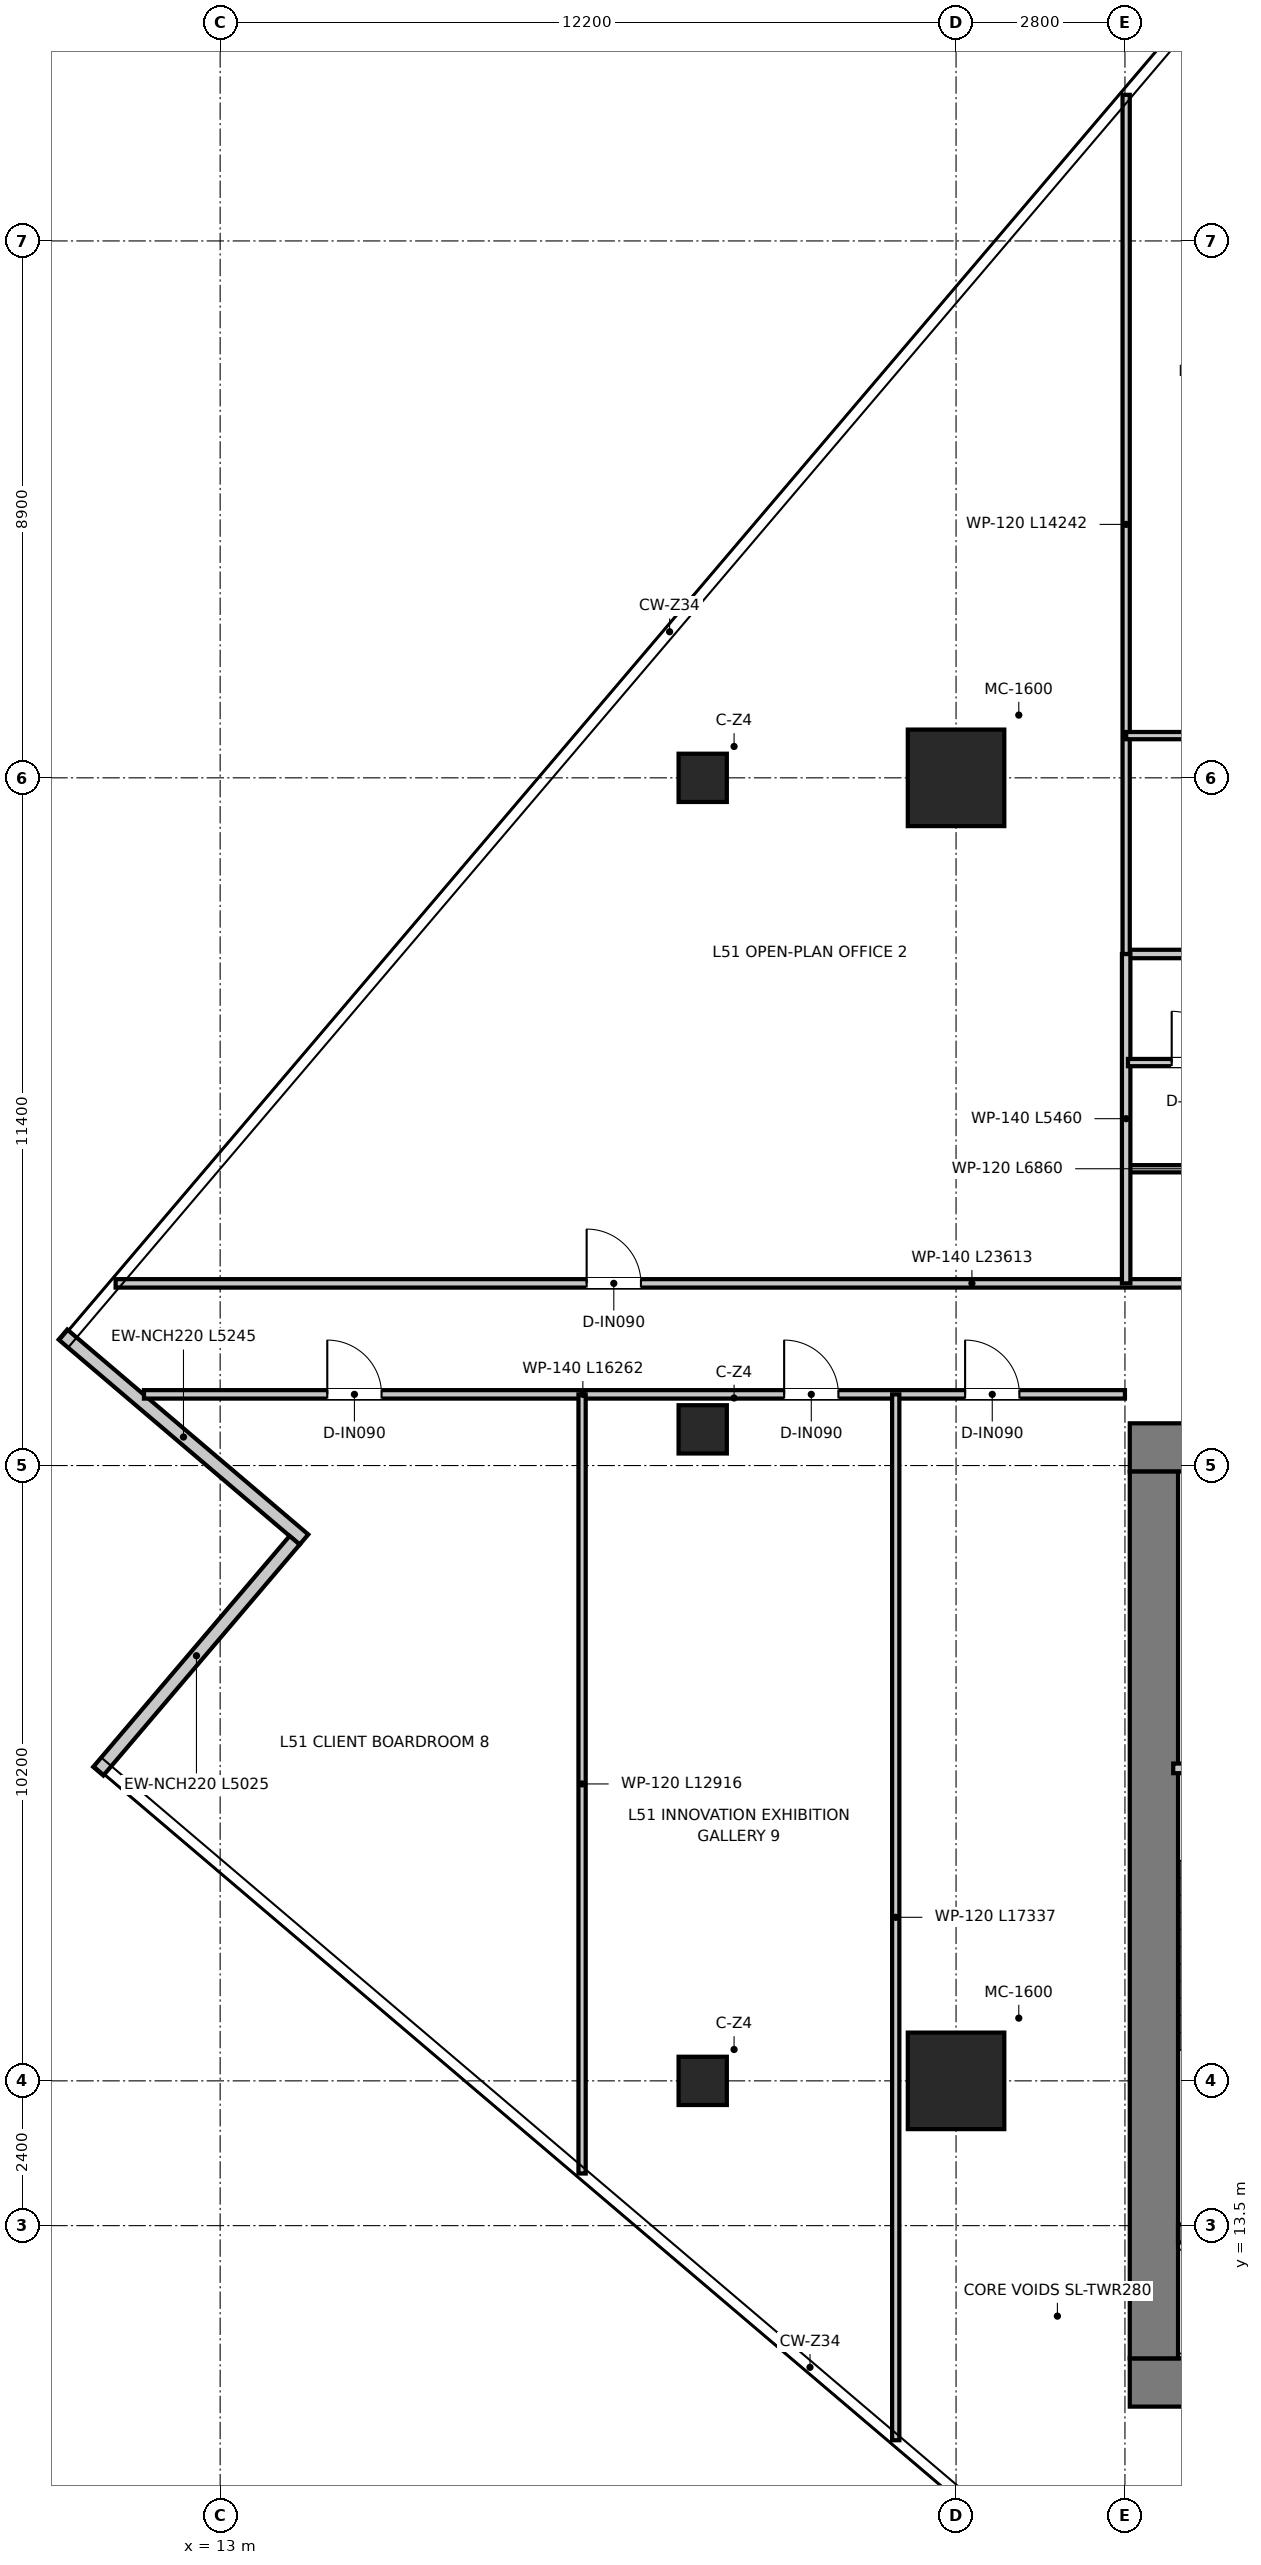
"""IFC4 building model, lengths in metres.
Left out: names, types, materials, properties, quantities, classifications, styles, units other than length and angle.
Written with IfcOpenShell. Run it as: python <this file> out.ifc"""

import sys

from ifc_helpers import new_model, si_unit, direction, frame, frame_2d, origin, origin_2d, place, context, subcontext, project, spatial, rectangle, extrude, source, transform, mapped, element, fill, save


model = new_model("IFC4")
c1 = context("Model", 3, precision=1e-05, world=origin(), true_north=direction((0.0, 1.0)))
c2 = subcontext(c1, "Body", "Model", "MODEL_VIEW")
j1 = project(units=[si_unit("LENGTHUNIT", "METRE"), si_unit("PLANEANGLEUNIT", "RADIAN")], contexts=[c1])
p1 = place(None, origin())
s1 = spatial("IfcSite", under=j1, at=p1, CompositionType="ELEMENT")
p2 = place(p1, origin())
s2 = spatial("IfcBuilding", under=s1, at=p2, CompositionType="ELEMENT")
p3 = place(p2, frame((0.0, 0.0, 211.25)))
s3 = spatial("IfcBuildingStorey", under=s2, at=p3, CompositionType="ELEMENT", Elevation=211.25)
p4 = place(p3, frame((28.08, 10.9, 0.0), z_axis=(0.0, 0.0, 1.0), x_axis=(1.0, 0.0, 0.0)))
e1 = element("IfcWall", 1, at=p4, inside=s3, PredefinedType="SHEAR", context=c2, shape_type="SweptSolid", body=[
    extrude(rectangle(XDim=15.84, YDim=0.8, at=frame_2d((7.92, 0.0))), origin(), (0.0, 0.0, 1.0), 3.95),
])
p5 = place(p3, frame((28.08, 26.4, 0.0), z_axis=(0.0, 0.0, 1.0), x_axis=(1.0, 0.0, 0.0)))
e2 = element("IfcWall", 2, at=p5, inside=s3, PredefinedType="SHEAR", context=c2, shape_type="SweptSolid", body=[
    extrude(rectangle(XDim=15.84, YDim=0.8, at=frame_2d((7.92, 0.0))), origin(), (0.0, 0.0, 1.0), 3.95),
])
p6 = place(p5, frame((7.22, 0.0, 0.0)))
e3 = element("IfcOpeningElement", 3, at=p6, cuts=e2, PredefinedType="OPENING", context=c2, shape_type="SweptSolid", body=[
    extrude(rectangle(XDim=1.4, YDim=2.2, at=frame_2d((0.7, 1.1))), frame((0.0, 0.41, 0.0), z_axis=(0.0, -1.0, 0.0), x_axis=(1.0, 0.0, 0.0)), (0.0, 0.0, 1.0), 0.82),
])
p7 = place(p5, frame((1.775, 0.0, 0.0)))
e4 = element("IfcOpeningElement", 4, at=p7, cuts=e2, PredefinedType="OPENING", context=c2, shape_type="SweptSolid", body=[
    extrude(rectangle(XDim=1.05, YDim=2.1, at=frame_2d((0.525, 1.05))), frame((0.0, 0.41, 0.0), z_axis=(0.0, -1.0, 0.0), x_axis=(1.0, 0.0, 0.0)), (0.0, 0.0, 1.0), 0.82),
])
p8 = place(p5, frame((13.015, 0.0, 0.0)))
e5 = element("IfcOpeningElement", 5, at=p8, cuts=e2, PredefinedType="OPENING", context=c2, shape_type="SweptSolid", body=[
    extrude(rectangle(XDim=1.05, YDim=2.1, at=frame_2d((0.525, 1.05))), frame((0.0, 0.41, 0.0), z_axis=(0.0, -1.0, 0.0), x_axis=(1.0, 0.0, 0.0)), (0.0, 0.0, 1.0), 0.82),
])
p9 = place(p3, frame((28.48, 11.3, 0.0), z_axis=(0.0, 0.0, 1.0), x_axis=(0.0, 1.0, 0.0)))
e6 = element("IfcWall", 6, at=p9, inside=s3, PredefinedType="SHEAR", context=c2, shape_type="SweptSolid", body=[
    extrude(rectangle(XDim=14.7, YDim=0.8, at=frame_2d((7.35, 0.0))), origin(), (0.0, 0.0, 1.0), 3.95),
])
p10 = place(p3, frame((28.88, 13.37, 0.0), z_axis=(0.0, 0.0, 1.0), x_axis=(1.0, 0.0, 0.0)))
e7 = element("IfcWall", 7, at=p10, inside=s3, PredefinedType="SHEAR", context=c2, shape_type="SweptSolid", body=[
    extrude(rectangle(XDim=3.1, YDim=0.3, at=frame_2d((1.55, 0.0))), origin(), (0.0, 0.0, 1.0), 3.95),
])
m1 = source(origin(), c2, "Body", "SweptSolid", [
    extrude(rectangle(XDim=1.6, YDim=1.6, at=origin_2d()), origin(), (0.0, 0.0, 1.0), 3.95),
])
for number, where, z_axis, x_axis in (
    (8, (25.2, 15.9, 0.0), (0.0, 0.0, 1.0), (1.0, 0.0, 0.0)),
    (9, (25.2, 37.5, 0.0), (0.0, 0.0, 1.0), (1.0, 0.0, 0.0)),
):
    element("IfcColumn", number, at=place(p3, frame(where, z_axis=z_axis, x_axis=x_axis)), inside=s3, PredefinedType="USERDEFINED", context=c2, shape_type="MappedRepresentation", body=[
        mapped(m1, transform((0.0, 0.0, 0.0), x_axis=(1.0, 0.0, 0.0), y_axis=(0.0, 1.0, 0.0), z_axis=(0.0, 0.0, 1.0), scale=1.0)),
    ])
m2 = source(origin(), c2, "Body", "SweptSolid", [
    extrude(rectangle(XDim=0.8, YDim=0.8, at=origin_2d()), origin(), (0.0, 0.0, 1.0), 3.95),
])
for number, where, z_axis, x_axis in (
    (10, (21.0, 15.9, 0.0), (0.0, 0.0, 1.0), (1.0, 0.0, 0.0)),
    (11, (21.0, 26.7, 0.0), (0.0, 0.0, 1.0), (1.0, 0.0, 0.0)),
    (12, (21.0, 37.5, 0.0), (0.0, 0.0, 1.0), (1.0, 0.0, 0.0)),
):
    element("IfcColumn", number, at=place(p3, frame(where, z_axis=z_axis, x_axis=x_axis)), inside=s3, PredefinedType="COLUMN", context=c2, shape_type="MappedRepresentation", body=[
        mapped(m2, transform((0.0, 0.0, 0.0), x_axis=(1.0, 0.0, 0.0), y_axis=(0.0, 1.0, 0.0), z_axis=(0.0, 0.0, 1.0), scale=1.0)),
    ])
p11 = place(p3, frame((10.394, 28.271, 0.0), z_axis=(0.0, 0.0, 1.0), x_axis=(0.761803778304, -0.647807844474, 0.0)))
e13 = element("IfcWall", 13, at=p11, inside=s3, PredefinedType="ELEMENTEDWALL", context=c2, shape_type="SweptSolid", body=[
    extrude(rectangle(XDim=5.245, YDim=0.22, at=frame_2d((2.623, 0.0))), origin(), (0.0, 0.0, 1.0), 3.67),
])
p12 = place(p3, frame((14.235, 24.861, 0.0), z_axis=(0.0, 0.0, 1.0), x_axis=(-0.647765464437, -0.761839814583, 0.0)))
e14 = element("IfcWall", 14, at=p12, inside=s3, PredefinedType="ELEMENTEDWALL", context=c2, shape_type="SweptSolid", body=[
    extrude(rectangle(XDim=5.025, YDim=0.22, at=frame_2d((2.513, 0.0))), origin(), (0.0, 0.0, 1.0), 3.67),
])
p13 = place(p3, frame((28.8, 21.08, 0.0), z_axis=(0.0, 0.0, 1.0), x_axis=(1.0, 0.0, 0.0)))
e15 = element("IfcWall", 15, at=p13, inside=s3, PredefinedType="PARTITIONING", context=c2, shape_type="SweptSolid", body=[
    extrude(rectangle(XDim=3.16, YDim=0.16, at=frame_2d((1.58, 0.0))), origin(), (0.0, 0.0, 1.0), 3.67),
])
p14 = place(p13, frame((1.055, 0.0, 0.0)))
e16 = element("IfcOpeningElement", 16, at=p14, cuts=e15, PredefinedType="OPENING", context=c2, shape_type="SweptSolid", body=[
    extrude(rectangle(XDim=1.05, YDim=2.1, at=frame_2d((0.525, 1.05))), frame((0.0, 0.09, 0.0), z_axis=(0.0, -1.0, 0.0), x_axis=(1.0, 0.0, 0.0)), (0.0, 0.0, 1.0), 0.18),
])
p15 = place(p3, frame((11.267, 29.12, 0.0), z_axis=(0.0, 0.0, 1.0), x_axis=(1.0, 0.0, 0.0)))
e17 = element("IfcWall", 17, at=p15, inside=s3, PredefinedType="PARTITIONING", context=c2, shape_type="SweptSolid", body=[
    extrude(rectangle(XDim=23.613, YDim=0.14, at=frame_2d((11.807, 0.0))), origin(), (0.0, 0.0, 1.0), 3.03),
])
p16 = place(p15, frame((19.683, 0.0, 0.0)))
e18 = element("IfcOpeningElement", 18, at=p16, cuts=e17, PredefinedType="OPENING", context=c2, shape_type="SweptSolid", body=[
    extrude(rectangle(XDim=0.9, YDim=2.1, at=frame_2d((0.45, 1.05))), frame((0.0, 0.08, 0.0), z_axis=(0.0, -1.0, 0.0), x_axis=(1.0, 0.0, 0.0)), (0.0, 0.0, 1.0), 0.16),
])
p17 = place(p15, frame((7.809, 0.0, 0.0)))
e19 = element("IfcOpeningElement", 19, at=p17, cuts=e17, PredefinedType="OPENING", context=c2, shape_type="SweptSolid", body=[
    extrude(rectangle(XDim=0.9, YDim=2.1, at=frame_2d((0.45, 1.05))), frame((0.0, 0.08, 0.0), z_axis=(0.0, -1.0, 0.0), x_axis=(1.0, 0.0, 0.0)), (0.0, 0.0, 1.0), 0.16),
])
p18 = place(p3, frame((11.738, 27.28, 0.0), z_axis=(0.0, 0.0, 1.0), x_axis=(1.0, 0.0, 0.0)))
e20 = element("IfcWall", 20, at=p18, inside=s3, PredefinedType="PARTITIONING", context=c2, shape_type="SweptSolid", body=[
    extrude(rectangle(XDim=16.262, YDim=0.14, at=frame_2d((8.131, 0.0))), origin(), (0.0, 0.0, 1.0), 3.03),
])
p19 = place(p18, frame((3.038, 0.0, 0.0)))
e21 = element("IfcOpeningElement", 21, at=p19, cuts=e20, PredefinedType="OPENING", context=c2, shape_type="SweptSolid", body=[
    extrude(rectangle(XDim=0.9, YDim=2.1, at=frame_2d((0.45, 1.05))), frame((0.0, 0.08, 0.0), z_axis=(0.0, -1.0, 0.0), x_axis=(1.0, 0.0, 0.0)), (0.0, 0.0, 1.0), 0.16),
])
p20 = place(p18, frame((10.612, 0.0, 0.0)))
e22 = element("IfcOpeningElement", 22, at=p20, cuts=e20, PredefinedType="OPENING", context=c2, shape_type="SweptSolid", body=[
    extrude(rectangle(XDim=0.9, YDim=2.1, at=frame_2d((0.45, 1.05))), frame((0.0, 0.08, 0.0), z_axis=(0.0, -1.0, 0.0), x_axis=(1.0, 0.0, 0.0)), (0.0, 0.0, 1.0), 0.16),
])
p21 = place(p18, frame((13.612, 0.0, 0.0)))
e23 = element("IfcOpeningElement", 23, at=p21, cuts=e20, PredefinedType="OPENING", context=c2, shape_type="SweptSolid", body=[
    extrude(rectangle(XDim=0.9, YDim=2.1, at=frame_2d((0.45, 1.05))), frame((0.0, 0.08, 0.0), z_axis=(0.0, -1.0, 0.0), x_axis=(1.0, 0.0, 0.0)), (0.0, 0.0, 1.0), 0.16),
])
p22 = place(p3, frame((28.02, 31.02, 0.0), z_axis=(0.0, 0.0, 1.0), x_axis=(1.0, 0.0, 0.0)))
e24 = element("IfcWall", 24, at=p22, inside=s3, PredefinedType="PARTITIONING", context=c2, shape_type="SweptSolid", body=[
    extrude(rectangle(XDim=6.86, YDim=0.12, at=frame_2d((3.43, 0.0))), origin(), (0.0, 0.0, 1.0), 3.18),
])
p23 = place(p3, frame((28.02, 34.58, 0.0), z_axis=(0.0, 0.0, 1.0), x_axis=(1.0, 0.0, 0.0)))
e25 = element("IfcWall", 25, at=p23, inside=s3, PredefinedType="PARTITIONING", context=c2, shape_type="SweptSolid", body=[
    extrude(rectangle(XDim=6.86, YDim=0.14, at=frame_2d((3.43, 0.0))), origin(), (0.0, 0.0, 1.0), 3.18),
])
p24 = place(p3, frame((28.02, 29.12, 0.0), z_axis=(0.0, 0.0, 1.0), x_axis=(0.0, 1.0, 0.0)))
e26 = element("IfcWall", 26, at=p24, inside=s3, PredefinedType="PARTITIONING", context=c2, shape_type="SweptSolid", body=[
    extrude(rectangle(XDim=5.46, YDim=0.14, at=frame_2d((2.73, 0.0))), origin(), (0.0, 0.0, 1.0), 3.37),
])
p25 = place(p3, frame((28.05, 32.78, 0.0), z_axis=(0.0, 0.0, 1.0), x_axis=(1.0, 0.0, 0.0)))
e27 = element("IfcWall", 27, at=p25, inside=s3, PredefinedType="PARTITIONING", context=c2, shape_type="SweptSolid", body=[
    extrude(rectangle(XDim=6.8, YDim=0.12, at=frame_2d((3.4, 0.0))), origin(), (0.0, 0.0, 1.0), 3.18),
])
p26 = place(p25, frame((0.725, 0.0, 0.0)))
e28 = element("IfcOpeningElement", 28, at=p26, cuts=e27, PredefinedType="OPENING", context=c2, shape_type="SweptSolid", body=[
    extrude(rectangle(XDim=0.85, YDim=2.1, at=frame_2d((0.425, 1.05))), frame((0.0, 0.07, 0.0), z_axis=(0.0, -1.0, 0.0), x_axis=(1.0, 0.0, 0.0)), (0.0, 0.0, 1.0), 0.14),
])
p27 = place(p25, frame((3.065, 0.0, 0.0)))
e29 = element("IfcOpeningElement", 29, at=p27, cuts=e27, PredefinedType="OPENING", context=c2, shape_type="SweptSolid", body=[
    extrude(rectangle(XDim=0.85, YDim=2.1, at=frame_2d((0.425, 1.05))), frame((0.0, 0.07, 0.0), z_axis=(0.0, -1.0, 0.0), x_axis=(1.0, 0.0, 0.0)), (0.0, 0.0, 1.0), 0.14),
])
p28 = place(p25, frame((5.25, 0.0, 0.0)))
e30 = element("IfcOpeningElement", 30, at=p28, cuts=e27, PredefinedType="OPENING", context=c2, shape_type="SweptSolid", body=[
    extrude(rectangle(XDim=0.9, YDim=2.1, at=frame_2d((0.45, 1.05))), frame((0.0, 0.07, 0.0), z_axis=(0.0, -1.0, 0.0), x_axis=(1.0, 0.0, 0.0)), (0.0, 0.0, 1.0), 0.14),
])
p29 = place(p3, frame((28.02, 34.58, 0.0), z_axis=(0.0, 0.0, 1.0), x_axis=(0.0, 1.0, 0.0)))
e31 = element("IfcWall", 31, at=p29, inside=s3, PredefinedType="PARTITIONING", context=c2, shape_type="SweptSolid", body=[
    extrude(rectangle(XDim=14.242, YDim=0.12, at=frame_2d((7.121, 0.0))), origin(), (0.0, 0.0, 1.0), 3.03),
])
p30 = place(p3, frame((28.02, 38.2, 0.0), z_axis=(0.0, 0.0, 1.0), x_axis=(1.0, 0.0, 0.0)))
e32 = element("IfcWall", 32, at=p30, inside=s3, PredefinedType="PARTITIONING", context=c2, shape_type="SweptSolid", body=[
    extrude(rectangle(XDim=6.86, YDim=0.12, at=frame_2d((3.43, 0.0))), origin(), (0.0, 0.0, 1.0), 3.18),
])
p31 = place(p3, frame((19.0, 14.364, 0.0), z_axis=(0.0, 0.0, 1.0), x_axis=(0.0, 1.0, 0.0)))
e33 = element("IfcWall", 33, at=p31, inside=s3, PredefinedType="PARTITIONING", context=c2, shape_type="SweptSolid", body=[
    extrude(rectangle(XDim=12.916, YDim=0.12, at=frame_2d((6.458, 0.0))), origin(), (0.0, 0.0, 1.0), 3.67),
])
p32 = place(p3, frame((24.2, 9.943, 0.0), z_axis=(0.0, 0.0, 1.0), x_axis=(0.0, 1.0, 0.0)))
e34 = element("IfcWall", 34, at=p32, inside=s3, PredefinedType="PARTITIONING", context=c2, shape_type="SweptSolid", body=[
    extrude(rectangle(XDim=17.337, YDim=0.12, at=frame_2d((8.669, 0.0))), origin(), (0.0, 0.0, 1.0), 3.18),
])
p33 = place(p26, origin())
e35 = element("IfcDoor", 35, at=p33, inside=s3, OperationType="SINGLE_SWING_LEFT", PredefinedType="DOOR", context=c2, shape_type="SweptSolid", body=[
    extrude(rectangle(XDim=0.85, YDim=2.1, at=frame_2d((0.425, 1.05))), frame((0.0, 0.025, 0.0), z_axis=(0.0, -1.0, 0.0), x_axis=(1.0, 0.0, 0.0)), (0.0, 0.0, 1.0), 0.05),
])
fill(e28, e35)
p34 = place(p17, origin())
e36 = element("IfcDoor", 36, at=p34, inside=s3, OperationType="SINGLE_SWING_LEFT", PredefinedType="DOOR", context=c2, shape_type="SweptSolid", body=[
    extrude(rectangle(XDim=0.9, YDim=2.1, at=frame_2d((0.45, 1.05))), frame((0.0, 0.025, 0.0), z_axis=(0.0, -1.0, 0.0), x_axis=(1.0, 0.0, 0.0)), (0.0, 0.0, 1.0), 0.05),
])
fill(e19, e36)
p35 = place(p19, origin())
e37 = element("IfcDoor", 37, at=p35, inside=s3, OperationType="SINGLE_SWING_LEFT", PredefinedType="DOOR", context=c2, shape_type="SweptSolid", body=[
    extrude(rectangle(XDim=0.9, YDim=2.1, at=frame_2d((0.45, 1.05))), frame((0.0, 0.025, 0.0), z_axis=(0.0, -1.0, 0.0), x_axis=(1.0, 0.0, 0.0)), (0.0, 0.0, 1.0), 0.05),
])
fill(e21, e37)
p36 = place(p20, origin())
e38 = element("IfcDoor", 38, at=p36, inside=s3, OperationType="SINGLE_SWING_LEFT", PredefinedType="DOOR", context=c2, shape_type="SweptSolid", body=[
    extrude(rectangle(XDim=0.9, YDim=2.1, at=frame_2d((0.45, 1.05))), frame((0.0, 0.025, 0.0), z_axis=(0.0, -1.0, 0.0), x_axis=(1.0, 0.0, 0.0)), (0.0, 0.0, 1.0), 0.05),
])
fill(e22, e38)
p37 = place(p21, origin())
e39 = element("IfcDoor", 39, at=p37, inside=s3, OperationType="SINGLE_SWING_LEFT", PredefinedType="DOOR", context=c2, shape_type="SweptSolid", body=[
    extrude(rectangle(XDim=0.9, YDim=2.1, at=frame_2d((0.45, 1.05))), frame((0.0, 0.025, 0.0), z_axis=(0.0, -1.0, 0.0), x_axis=(1.0, 0.0, 0.0)), (0.0, 0.0, 1.0), 0.05),
])
fill(e23, e39)
save(model, sys.argv[1])
